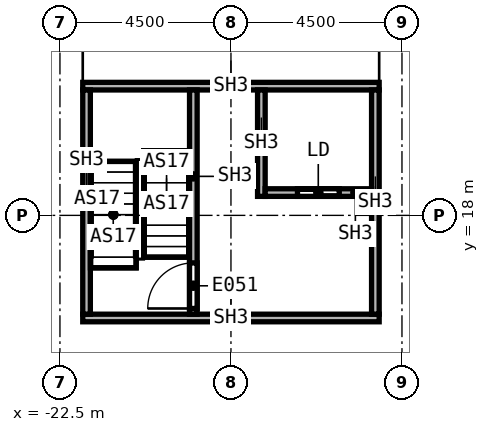
"""IFC4 building model, lengths in metres.
Left out: names, types, materials, properties, quantities, classifications, styles, units other than length and angle.
Written with IfcOpenShell. Run it as: python <this file> out.ifc"""

import sys

from ifc_helpers import new_model, si_unit, direction, frame, frame_2d, origin, place, context, subcontext, project, spatial, rectangle, extrude, element, fill, save


model = new_model("IFC4")
c1 = context("Model", 3, precision=1e-05, world=origin(), true_north=direction((0.0, 1.0)))
c2 = subcontext(c1, "Body", "Model", "MODEL_VIEW")
j1 = project(units=[si_unit("LENGTHUNIT", "METRE"), si_unit("PLANEANGLEUNIT", "RADIAN")], contexts=[c1])
p1 = place(None, origin())
s1 = spatial("IfcSite", under=j1, at=p1, CompositionType="ELEMENT")
p2 = place(p1, origin())
s2 = spatial("IfcBuilding", under=s1, at=p2, CompositionType="ELEMENT")
p3 = place(p2, frame((0.0, 0.0, 37.0)))
s3 = spatial("IfcBuildingStorey", under=s2, at=p3, CompositionType="ELEMENT", Elevation=37.0)
for number, where, z_axis, x_axis in (
    (1, (-21.9, 15.3, 0.0), (0.0, 0.0, 1.0), (1.0, 0.0, 0.0)),
    (2, (-21.9, 21.4, 0.0), (0.0, 0.0, 1.0), (1.0, 0.0, 0.0)),
):
    element("IfcWall", number, at=place(p3, frame(where, z_axis=z_axis, x_axis=x_axis)), inside=s3, PredefinedType="SOLIDWALL", context=c2, shape_type="SweptSolid", body=[
        extrude(rectangle(XDim=7.8, YDim=0.2, at=frame_2d((3.9, 0.0))), origin(), (0.0, 0.0, 1.0), 6.7),
    ])
for number, where, z_axis, x_axis in (
    (3, (-21.8, 15.4, 0.0), (0.0, 0.0, 1.0), (0.0, 1.0, 0.0)),
    (4, (-14.2, 15.4, 0.0), (0.0, 0.0, 1.0), (0.0, 1.0, 0.0)),
):
    element("IfcWall", number, at=place(p3, frame(where, z_axis=z_axis, x_axis=x_axis)), inside=s3, PredefinedType="SOLIDWALL", context=c2, shape_type="SweptSolid", body=[
        extrude(rectangle(XDim=5.9, YDim=0.2, at=frame_2d((2.95, 0.0))), origin(), (0.0, 0.0, 1.0), 6.7),
    ])
p4 = place(p3, frame((-18.99, 15.4, 0.0), z_axis=(0.0, 0.0, 1.0), x_axis=(0.0, 1.0, 0.0)))
e5 = element("IfcWall", 5, at=p4, inside=s3, PredefinedType="SOLIDWALL", context=c2, shape_type="SweptSolid", body=[
    extrude(rectangle(XDim=5.9, YDim=0.2, at=frame_2d((2.95, 0.0))), origin(), (0.0, 0.0, 1.0), 6.7),
])
p5 = place(p4, frame((0.15, 0.0, 0.0)))
e6 = element("IfcOpeningElement", 6, at=p5, cuts=e5, PredefinedType="OPENING", context=c2, shape_type="SweptSolid", body=[
    extrude(rectangle(XDim=1.2, YDim=2.1, at=frame_2d((0.6, 1.05))), frame((0.0, 0.1, 0.0), z_axis=(0.0, -1.0, 0.0), x_axis=(1.0, 0.0, 0.0)), (0.0, 0.0, 1.0), 0.2),
])
p6 = place(p3, frame((-17.2, 18.5, 0.0), z_axis=(0.0, 0.0, 1.0), x_axis=(0.0, 1.0, 0.0)))
e7 = element("IfcWall", 7, at=p6, inside=s3, PredefinedType="SOLIDWALL", context=c2, shape_type="SweptSolid", body=[
    extrude(rectangle(XDim=2.8, YDim=0.2, at=frame_2d((1.4, 0.0))), origin(), (0.0, 0.0, 1.0), 6.7),
])
p7 = place(p3, frame((-17.1, 18.6, 0.0), z_axis=(0.0, 0.0, 1.0), x_axis=(1.0, 0.0, 0.0)))
e8 = element("IfcWall", 8, at=p7, inside=s3, PredefinedType="SOLIDWALL", context=c2, shape_type="SweptSolid", body=[
    extrude(rectangle(XDim=2.8, YDim=0.2, at=frame_2d((1.4, 0.0))), origin(), (0.0, 0.0, 1.0), 6.7),
])
p8 = place(p7, frame((0.85, 0.0, 0.0)))
e9 = element("IfcOpeningElement", 9, at=p8, cuts=e8, PredefinedType="OPENING", context=c2, shape_type="SweptSolid", body=[
    extrude(rectangle(XDim=1.1, YDim=2.1, at=frame_2d((0.55, 1.05))), frame((0.0, 0.1, 0.0), z_axis=(0.0, -1.0, 0.0), x_axis=(1.0, 0.0, 0.0)), (0.0, 0.0, 1.0), 0.2),
])
p9 = place(p5, origin())
e10 = element("IfcDoor", 10, at=p9, inside=s3, OperationType="SINGLE_SWING_LEFT", PredefinedType="DOOR", context=c2, shape_type="SweptSolid", body=[
    extrude(rectangle(XDim=1.2, YDim=2.1, at=frame_2d((0.6, 1.05))), frame((0.0, 0.025, 0.0), z_axis=(0.0, -1.0, 0.0), x_axis=(1.0, 0.0, 0.0)), (0.0, 0.0, 1.0), 0.05),
])
fill(e6, e10)
p10 = place(p8, origin())
e11 = element("IfcDoor", 11, at=p10, inside=s3, OperationType="SLIDING_TO_LEFT", PredefinedType="DOOR", context=c2, shape_type="SweptSolid", body=[
    extrude(rectangle(XDim=1.1, YDim=2.1, at=frame_2d((0.55, 1.05))), frame((0.0, 0.025, 0.0), z_axis=(0.0, -1.0, 0.0), x_axis=(1.0, 0.0, 0.0)), (0.0, 0.0, 1.0), 0.05),
])
fill(e9, e11)
save(model, sys.argv[1])
